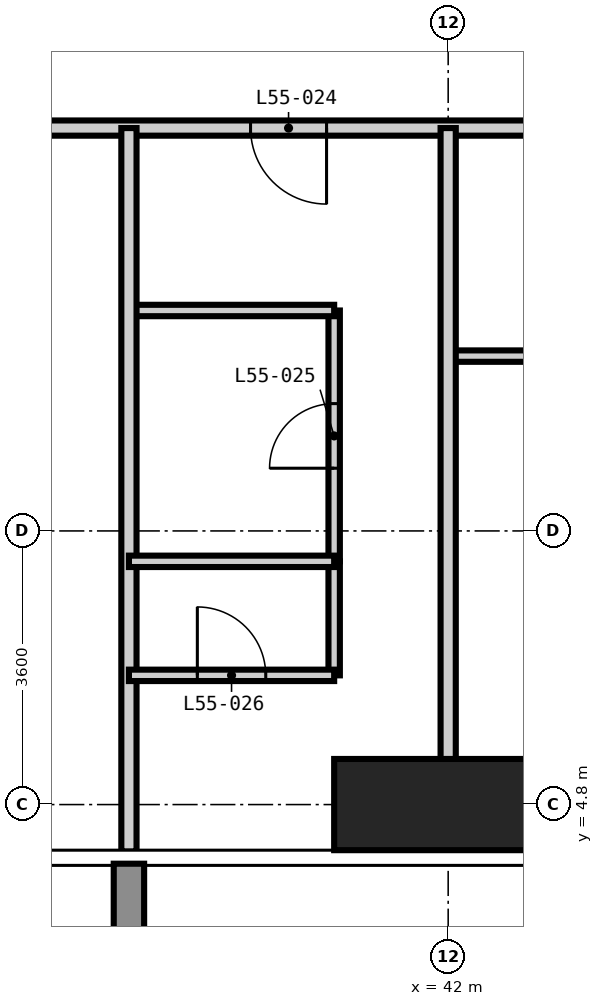
"""IFC4 building model, lengths in metres.
Left out: names, types, materials, properties, quantities, classifications, styles, units other than length and angle.
Written with IfcOpenShell. Run it as: python <this file> out.ifc"""

import sys

from ifc_helpers import new_model, si_unit, direction, frame, frame_2d, origin, origin_2d, place, context, subcontext, project, spatial, rectangle, extrude, element, fill, save


model = new_model("IFC4")
c1 = context("Model", 3, precision=1e-05, world=origin(), true_north=direction((0.0, 1.0)))
c2 = subcontext(c1, "Body", "Model", "MODEL_VIEW")
j1 = project(units=[si_unit("LENGTHUNIT", "METRE"), si_unit("PLANEANGLEUNIT", "RADIAN")], contexts=[c1])
p1 = place(None, origin())
s1 = spatial("IfcSite", under=j1, at=p1, CompositionType="ELEMENT")
p2 = place(p1, origin())
s2 = spatial("IfcBuilding", under=s1, at=p2, CompositionType="ELEMENT")
p3 = place(p2, frame((0.0, 0.0, 213.0)))
s3 = spatial("IfcBuildingStorey", under=s2, at=p3, CompositionType="ELEMENT", Elevation=213.0)
p4 = place(p3, frame((42.0, 4.8, -0.35), z_axis=(0.0, 0.0, 1.0), x_axis=(1.0, 0.0, 0.0)))
e1 = element("IfcColumn", 1, at=p4, inside=s3, PredefinedType="COLUMN", context=c2, shape_type="SweptSolid", body=[
    extrude(rectangle(XDim=3.0, YDim=1.2, at=origin_2d()), origin(), (0.0, 0.0, 1.0), 3.6),
])
p5 = place(p3, frame((40.5, 8.0, 0.0), z_axis=(0.0, 0.0, 1.0), x_axis=(0.0, 1.0, 0.0)))
e2 = element("IfcWall", 2, at=p5, inside=s3, PredefinedType="PARTITIONING", context=c2, shape_type="SweptSolid", body=[
    extrude(rectangle(XDim=3.3, YDim=0.15, at=frame_2d((1.65, 0.0))), origin(), (0.0, 0.0, 1.0), 3.25),
])
p6 = place(p5, frame((1.225, 0.0, 0.0)))
e3 = element("IfcOpeningElement", 3, at=p6, cuts=e2, PredefinedType="OPENING", context=c2, shape_type="SweptSolid", body=[
    extrude(rectangle(XDim=0.85, YDim=2.1, at=frame_2d((0.425, 1.05))), frame((0.0, 0.085, 0.0), z_axis=(0.0, -1.0, 0.0), x_axis=(1.0, 0.0, 0.0)), (0.0, 0.0, 1.0), 0.17),
])
p7 = place(p3, frame((42.0, 10.7, 0.0), z_axis=(0.0, 0.0, 1.0), x_axis=(1.0, 0.0, 0.0)))
e4 = element("IfcWall", 4, at=p7, inside=s3, PredefinedType="PARTITIONING", context=c2, shape_type="SweptSolid", body=[
    extrude(rectangle(XDim=3.7, YDim=0.15, at=frame_2d((1.85, 0.0))), origin(), (0.0, 0.0, 1.0), 3.25),
])
p8 = place(p7, frame((1.425, 0.0, 0.0)))
e5 = element("IfcOpeningElement", 5, at=p8, cuts=e4, PredefinedType="OPENING", context=c2, shape_type="SweptSolid", body=[
    extrude(rectangle(XDim=0.85, YDim=2.1, at=frame_2d((0.425, 1.05))), frame((0.0, 0.085, 0.0), z_axis=(0.0, -1.0, 0.0), x_axis=(1.0, 0.0, 0.0)), (0.0, 0.0, 1.0), 0.17),
])
p9 = place(p3, frame((37.8, 11.3, 0.0), z_axis=(0.0, 0.0, 1.0), x_axis=(1.0, 0.0, 0.0)))
e6 = element("IfcWall", 6, at=p9, inside=s3, PredefinedType="PARTITIONING", context=c2, shape_type="SweptSolid", body=[
    extrude(rectangle(XDim=2.7, YDim=0.15, at=frame_2d((1.35, 0.0))), origin(), (0.0, 0.0, 1.0), 3.25),
])
p10 = place(p3, frame((45.7, 13.7, 0.0), z_axis=(0.0, 0.0, 1.0), x_axis=(-1.0, 0.0, 0.0)))
e7 = element("IfcWall", 7, at=p10, inside=s3, PredefinedType="PARTITIONING", context=c2, shape_type="SweptSolid", body=[
    extrude(rectangle(XDim=32.0, YDim=0.2, at=frame_2d((16.0, 0.0))), origin(), (0.0, 0.0, 1.0), 3.25),
])
p11 = place(p10, frame((26.3, 0.0, 0.0)))
e8 = element("IfcOpeningElement", 8, at=p11, cuts=e7, PredefinedType="OPENING", context=c2, shape_type="SweptSolid", body=[
    extrude(rectangle(XDim=1.0, YDim=2.2, at=frame_2d((0.5, 1.1))), frame((0.0, 0.11, 0.0), z_axis=(0.0, -1.0, 0.0), x_axis=(1.0, 0.0, 0.0)), (0.0, 0.0, 1.0), 0.22),
])
p12 = place(p10, frame((22.1, 0.0, 0.0)))
e9 = element("IfcOpeningElement", 9, at=p12, cuts=e7, PredefinedType="OPENING", context=c2, shape_type="SweptSolid", body=[
    extrude(rectangle(XDim=1.0, YDim=2.2, at=frame_2d((0.5, 1.1))), frame((0.0, 0.11, 0.0), z_axis=(0.0, -1.0, 0.0), x_axis=(1.0, 0.0, 0.0)), (0.0, 0.0, 1.0), 0.22),
])
p13 = place(p10, frame((17.9, 0.0, 0.0)))
e10 = element("IfcOpeningElement", 10, at=p13, cuts=e7, PredefinedType="OPENING", context=c2, shape_type="SweptSolid", body=[
    extrude(rectangle(XDim=1.0, YDim=2.2, at=frame_2d((0.5, 1.1))), frame((0.0, 0.11, 0.0), z_axis=(0.0, -1.0, 0.0), x_axis=(1.0, 0.0, 0.0)), (0.0, 0.0, 1.0), 0.22),
])
p14 = place(p10, frame((13.7, 0.0, 0.0)))
e11 = element("IfcOpeningElement", 11, at=p14, cuts=e7, PredefinedType="OPENING", context=c2, shape_type="SweptSolid", body=[
    extrude(rectangle(XDim=1.0, YDim=2.2, at=frame_2d((0.5, 1.1))), frame((0.0, 0.11, 0.0), z_axis=(0.0, -1.0, 0.0), x_axis=(1.0, 0.0, 0.0)), (0.0, 0.0, 1.0), 0.22),
])
p15 = place(p10, frame((9.5, 0.0, 0.0)))
e12 = element("IfcOpeningElement", 12, at=p15, cuts=e7, PredefinedType="OPENING", context=c2, shape_type="SweptSolid", body=[
    extrude(rectangle(XDim=1.0, YDim=2.2, at=frame_2d((0.5, 1.1))), frame((0.0, 0.11, 0.0), z_axis=(0.0, -1.0, 0.0), x_axis=(1.0, 0.0, 0.0)), (0.0, 0.0, 1.0), 0.22),
])
p16 = place(p10, frame((5.3, 0.0, 0.0)))
e13 = element("IfcOpeningElement", 13, at=p16, cuts=e7, PredefinedType="OPENING", context=c2, shape_type="SweptSolid", body=[
    extrude(rectangle(XDim=1.0, YDim=2.2, at=frame_2d((0.5, 1.1))), frame((0.0, 0.11, 0.0), z_axis=(0.0, -1.0, 0.0), x_axis=(1.0, 0.0, 0.0)), (0.0, 0.0, 1.0), 0.22),
])
for number, where, z_axis, x_axis in (
    (14, (37.8, 4.182, 0.0), (0.0, 0.0, 1.0), (0.0, 1.0, 0.0)),
    (15, (42.0, 4.182, 0.0), (0.0, 0.0, 1.0), (0.0, 1.0, 0.0)),
):
    element("IfcWall", number, at=place(p3, frame(where, z_axis=z_axis, x_axis=x_axis)), inside=s3, PredefinedType="PARTITIONING", context=c2, shape_type="SweptSolid", body=[
        extrude(rectangle(XDim=9.518, YDim=0.2, at=frame_2d((4.759, 0.0))), origin(), (0.0, 0.0, 1.0), 3.25),
    ])
p17 = place(p3, frame((40.5, 6.5, 0.0), z_axis=(0.0, 0.0, 1.0), x_axis=(0.0, 1.0, 0.0)))
e16 = element("IfcWall", 16, at=p17, inside=s3, PredefinedType="PARTITIONING", context=c2, shape_type="SweptSolid", body=[
    extrude(rectangle(XDim=1.5, YDim=0.15, at=frame_2d((0.75, 0.0))), origin(), (0.0, 0.0, 1.0), 3.25),
])
p18 = place(p3, frame((37.8, 6.5, 0.0), z_axis=(0.0, 0.0, 1.0), x_axis=(1.0, 0.0, 0.0)))
e17 = element("IfcWall", 17, at=p18, inside=s3, PredefinedType="PARTITIONING", context=c2, shape_type="SweptSolid", body=[
    extrude(rectangle(XDim=2.7, YDim=0.15, at=frame_2d((1.35, 0.0))), origin(), (0.0, 0.0, 1.0), 3.25),
])
p19 = place(p18, frame((0.9, 0.0, 0.0)))
e18 = element("IfcOpeningElement", 18, at=p19, cuts=e17, PredefinedType="OPENING", context=c2, shape_type="SweptSolid", body=[
    extrude(rectangle(XDim=0.9, YDim=2.1, at=frame_2d((0.45, 1.05))), frame((0.0, 0.085, 0.0), z_axis=(0.0, -1.0, 0.0), x_axis=(1.0, 0.0, 0.0)), (0.0, 0.0, 1.0), 0.17),
])
p20 = place(p3, frame((37.8, 8.0, 0.0), z_axis=(0.0, 0.0, 1.0), x_axis=(1.0, 0.0, 0.0)))
e19 = element("IfcWall", 19, at=p20, inside=s3, PredefinedType="PARTITIONING", context=c2, shape_type="SweptSolid", body=[
    extrude(rectangle(XDim=2.7, YDim=0.15, at=frame_2d((1.35, 0.0))), origin(), (0.0, 0.0, 1.0), 3.25),
])
p21 = place(p16, origin())
e20 = element("IfcDoor", 20, at=p21, inside=s3, OperationType="SINGLE_SWING_LEFT", PredefinedType="DOOR", context=c2, shape_type="SweptSolid", body=[
    extrude(rectangle(XDim=1.0, YDim=2.2, at=frame_2d((0.5, 1.1))), frame((0.0, 0.025, 0.0), z_axis=(0.0, -1.0, 0.0), x_axis=(1.0, 0.0, 0.0)), (0.0, 0.0, 1.0), 0.05),
])
fill(e13, e20)
p22 = place(p6, origin())
e21 = element("IfcDoor", 21, at=p22, inside=s3, OperationType="SINGLE_SWING_LEFT", PredefinedType="DOOR", context=c2, shape_type="SweptSolid", body=[
    extrude(rectangle(XDim=0.85, YDim=2.1, at=frame_2d((0.425, 1.05))), frame((0.0, 0.025, 0.0), z_axis=(0.0, -1.0, 0.0), x_axis=(1.0, 0.0, 0.0)), (0.0, 0.0, 1.0), 0.05),
])
fill(e3, e21)
p23 = place(p19, origin())
e22 = element("IfcDoor", 22, at=p23, inside=s3, OperationType="SINGLE_SWING_LEFT", PredefinedType="DOOR", context=c2, shape_type="SweptSolid", body=[
    extrude(rectangle(XDim=0.9, YDim=2.1, at=frame_2d((0.45, 1.05))), frame((0.0, 0.025, 0.0), z_axis=(0.0, -1.0, 0.0), x_axis=(1.0, 0.0, 0.0)), (0.0, 0.0, 1.0), 0.05),
])
fill(e18, e22)
save(model, sys.argv[1])
